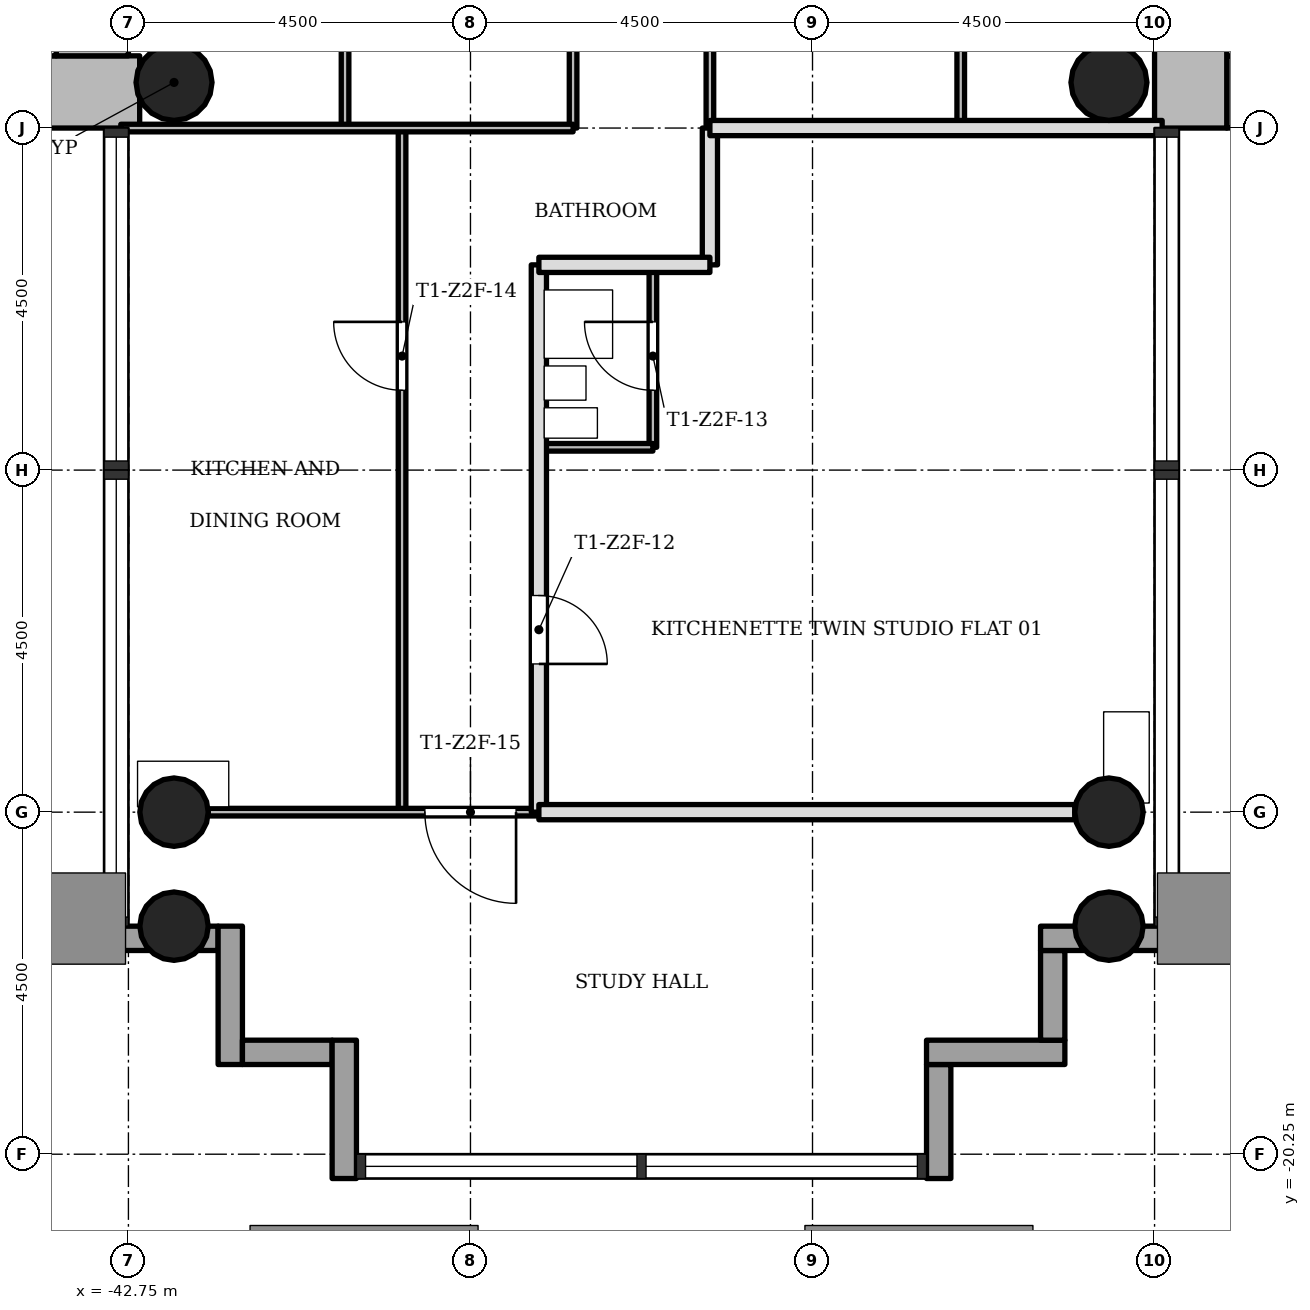
"""IFC4 building model, lengths in metres.
Left out: names, types, materials, properties, quantities, classifications, styles, units other than length and angle.
Written with IfcOpenShell. Run it as: python <this file> out.ifc"""

import sys

from ifc_helpers import new_model, si_unit, direction, frame, frame_2d, origin, origin_2d, place, context, subcontext, project, spatial, rectangle, hollow_circle, extrude, element, fill, save


model = new_model("IFC4")
c1 = context("Model", 3, precision=1e-05, world=origin(), true_north=direction((0.0, 1.0)))
c2 = subcontext(c1, "Body", "Model", "MODEL_VIEW")
j1 = project(units=[si_unit("LENGTHUNIT", "METRE"), si_unit("PLANEANGLEUNIT", "RADIAN")], contexts=[c1])
p1 = place(None, origin())
s1 = spatial("IfcSite", under=j1, at=p1, CompositionType="ELEMENT")
p2 = place(p1, origin())
s2 = spatial("IfcBuilding", under=s1, at=p2, CompositionType="ELEMENT")
p3 = place(p2, frame((0.0, 0.0, 114.0)))
s3 = spatial("IfcBuildingStorey", under=s2, at=p3, CompositionType="ELEMENT", Elevation=114.0)
p4 = place(p3, frame((-28.3, -6.275, 0.0), z_axis=(0.0, 0.0, 1.0), x_axis=(1.0, 0.0, 0.0)))
e1 = element("IfcWall", 1, at=p4, inside=s3, PredefinedType="SHEAR", context=c2, shape_type="SweptSolid", body=[
    extrude(rectangle(XDim=8.05, YDim=0.95, at=frame_2d((4.025, 0.0))), origin(), (0.0, 0.0, 1.0), 3.4),
])
p5 = place(p3, frame((-28.775, 5.8, 0.0), z_axis=(0.0, 0.0, 1.0), x_axis=(0.0, -1.0, 0.0)))
e2 = element("IfcWall", 2, at=p5, inside=s3, PredefinedType="SHEAR", context=c2, shape_type="SweptSolid", body=[
    extrude(rectangle(XDim=12.55, YDim=0.95, at=frame_2d((6.275, 0.0))), origin(), (0.0, 0.0, 1.0), 3.4),
])
p6 = place(p5, frame((4.9, 0.0, 0.0)))
e3 = element("IfcOpeningElement", 3, at=p6, cuts=e2, PredefinedType="OPENING", context=c2, shape_type="SweptSolid", body=[
    extrude(rectangle(XDim=1.8, YDim=2.1, at=frame_2d((0.9, 1.05))), frame((0.0, 0.485, 0.0), z_axis=(0.0, -1.0, 0.0), x_axis=(1.0, 0.0, 0.0)), (0.0, 0.0, 1.0), 0.97),
])
p7 = place(p3, frame((-51.298, -6.275, 0.0), z_axis=(0.0, 0.0, 1.0), x_axis=(1.0, 0.0, 0.0)))
e4 = element("IfcWall", 4, at=p7, inside=s3, PredefinedType="SHEAR", context=c2, shape_type="SweptSolid", body=[
    extrude(rectangle(XDim=8.696, YDim=0.95, at=frame_2d((4.348, 0.0))), origin(), (0.0, 0.0, 1.0), 3.4),
])
p8 = place(p3, frame((-43.225, -5.8, 0.0), z_axis=(0.0, 0.0, 1.0), x_axis=(0.0, 1.0, 0.0)))
e5 = element("IfcWall", 5, at=p8, inside=s3, PredefinedType="SHEAR", context=c2, shape_type="SweptSolid", body=[
    extrude(rectangle(XDim=12.55, YDim=0.95, at=frame_2d((6.275, 0.0))), origin(), (0.0, 0.0, 1.0), 3.4),
])
p9 = place(p8, frame((4.9, 0.0, 0.0)))
e6 = element("IfcOpeningElement", 6, at=p9, cuts=e5, PredefinedType="OPENING", context=c2, shape_type="SweptSolid", body=[
    extrude(rectangle(XDim=1.8, YDim=2.1, at=frame_2d((0.9, 1.05))), frame((0.0, 0.485, 0.0), z_axis=(0.0, -1.0, 0.0), x_axis=(1.0, 0.0, 0.0)), (0.0, 0.0, 1.0), 0.97),
])
for number, where, z_axis, x_axis in (
    (7, (-42.15, -15.75, 0.0), (0.0, 0.0, 1.0), (1.0, 0.0, 0.0)),
    (8, (-29.85, -15.75, 0.0), (0.0, 0.0, 1.0), (1.0, 0.0, 0.0)),
    (9, (-42.15, -17.25, 0.0), (0.0, 0.0, 1.0), (1.0, 0.0, 0.0)),
    (10, (-29.85, -17.25, 0.0), (0.0, 0.0, 1.0), (1.0, 0.0, 0.0)),
):
    element("IfcColumn", number, at=place(p3, frame(where, z_axis=z_axis, x_axis=x_axis)), inside=s3, PredefinedType="COLUMN", context=c2, shape_type="SweptSolid", body=[
        extrude(hollow_circle(Radius=0.45, WallThickness=0.032, at=origin_2d()), origin(), (0.0, 0.0, 1.0), 3.4),
    ])
for number, where, z_axis, x_axis in (
    (11, (-42.15, -6.15, 0.0), (0.0, 0.0, 1.0), (1.0, 0.0, 0.0)),
    (12, (-29.85, -6.15, 0.0), (0.0, 0.0, 1.0), (1.0, 0.0, 0.0)),
):
    element("IfcColumn", number, at=place(p3, frame(where, z_axis=z_axis, x_axis=x_axis)), inside=s3, PredefinedType="COLUMN", context=c2, shape_type="SweptSolid", body=[
        extrude(hollow_circle(Radius=0.5, WallThickness=0.036, at=origin_2d()), origin(), (0.0, 0.0, 1.0), 3.4),
    ])
p10 = place(p3, frame((-43.07, -17.41, -0.3), z_axis=(0.0, 0.0, 1.0), x_axis=(1.0, 0.0, 0.0)))
e13 = element("IfcWall", 13, at=p10, inside=s3, PredefinedType="STANDARD", context=c2, shape_type="SweptSolid", body=[
    extrude(rectangle(XDim=1.5, YDim=0.32, at=frame_2d((0.75, 0.0))), origin(), (0.0, 0.0, 1.0), 3.4),
])
p11 = place(p3, frame((-41.41, -17.25, -0.3), z_axis=(0.0, 0.0, 1.0), x_axis=(0.0, -1.0, 0.0)))
e14 = element("IfcWall", 14, at=p11, inside=s3, PredefinedType="STANDARD", context=c2, shape_type="SweptSolid", body=[
    extrude(rectangle(XDim=1.82, YDim=0.32, at=frame_2d((0.91, 0.0))), origin(), (0.0, 0.0, 1.0), 3.4),
])
p12 = place(p3, frame((-41.25, -18.91, -0.3), z_axis=(0.0, 0.0, 1.0), x_axis=(1.0, 0.0, 0.0)))
e15 = element("IfcWall", 15, at=p12, inside=s3, PredefinedType="STANDARD", context=c2, shape_type="SweptSolid", body=[
    extrude(rectangle(XDim=1.18, YDim=0.32, at=frame_2d((0.59, 0.0))), origin(), (0.0, 0.0, 1.0), 3.4),
])
p13 = place(p3, frame((-39.91, -18.75, -0.3), z_axis=(0.0, 0.0, 1.0), x_axis=(0.0, -1.0, 0.0)))
e16 = element("IfcWall", 16, at=p13, inside=s3, PredefinedType="STANDARD", context=c2, shape_type="SweptSolid", body=[
    extrude(rectangle(XDim=1.82, YDim=0.32, at=frame_2d((0.91, 0.0))), origin(), (0.0, 0.0, 1.0), 3.4),
])
p14 = place(p3, frame((-32.09, -20.57, -0.3), z_axis=(0.0, 0.0, 1.0), x_axis=(0.0, 1.0, 0.0)))
e17 = element("IfcWall", 17, at=p14, inside=s3, PredefinedType="STANDARD", context=c2, shape_type="SweptSolid", body=[
    extrude(rectangle(XDim=1.5, YDim=0.32, at=frame_2d((0.75, 0.0))), origin(), (0.0, 0.0, 1.0), 3.4),
])
p15 = place(p3, frame((-32.25, -18.91, -0.3), z_axis=(0.0, 0.0, 1.0), x_axis=(1.0, 0.0, 0.0)))
e18 = element("IfcWall", 18, at=p15, inside=s3, PredefinedType="STANDARD", context=c2, shape_type="SweptSolid", body=[
    extrude(rectangle(XDim=1.82, YDim=0.32, at=frame_2d((0.91, 0.0))), origin(), (0.0, 0.0, 1.0), 3.4),
])
p16 = place(p3, frame((-30.59, -18.75, -0.3), z_axis=(0.0, 0.0, 1.0), x_axis=(0.0, 1.0, 0.0)))
e19 = element("IfcWall", 19, at=p16, inside=s3, PredefinedType="STANDARD", context=c2, shape_type="SweptSolid", body=[
    extrude(rectangle(XDim=1.18, YDim=0.32, at=frame_2d((0.59, 0.0))), origin(), (0.0, 0.0, 1.0), 3.4),
])
p17 = place(p3, frame((-30.75, -17.41, -0.3), z_axis=(0.0, 0.0, 1.0), x_axis=(1.0, 0.0, 0.0)))
e20 = element("IfcWall", 20, at=p17, inside=s3, PredefinedType="STANDARD", context=c2, shape_type="SweptSolid", body=[
    extrude(rectangle(XDim=1.82, YDim=0.32, at=frame_2d((0.91, 0.0))), origin(), (0.0, 0.0, 1.0), 3.4),
])
p18 = place(p3, frame((-39.9, -6.75, 0.0), z_axis=(0.0, 0.0, 1.0), x_axis=(0.0, 1.0, 0.0)))
e21 = element("IfcWall", 21, at=p18, inside=s3, PredefinedType="PARTITIONING", context=c2, shape_type="SweptSolid", body=[
    extrude(rectangle(XDim=5.25, YDim=0.1, at=frame_2d((2.625, 0.0))), origin(), (0.0, 0.0, 1.0), 3.0),
])
p19 = place(p3, frame((-39.15, -15.75, 0.0), z_axis=(0.0, 0.0, 1.0), x_axis=(0.0, 1.0, 0.0)))
e22 = element("IfcWall", 22, at=p19, inside=s3, PredefinedType="PARTITIONING", context=c2, shape_type="SweptSolid", body=[
    extrude(rectangle(XDim=9.0, YDim=0.1, at=frame_2d((4.5, 0.0))), origin(), (0.0, 0.0, 1.0), 3.0),
])
p20 = place(p19, frame((5.55, 0.0, 0.0)))
e23 = element("IfcOpeningElement", 23, at=p20, cuts=e22, PredefinedType="OPENING", context=c2, shape_type="SweptSolid", body=[
    extrude(rectangle(XDim=0.9, YDim=2.1, at=frame_2d((0.45, 1.05))), frame((0.0, 0.06, 0.0), z_axis=(0.0, -1.0, 0.0), x_axis=(1.0, 0.0, 0.0)), (0.0, 0.0, 1.0), 0.12),
])
p21 = place(p3, frame((-37.35, -15.75, 0.0), z_axis=(0.0, 0.0, 1.0), x_axis=(0.0, 1.0, 0.0)))
e24 = element("IfcWall", 24, at=p21, inside=s3, PredefinedType="SOLIDWALL", context=c2, shape_type="SweptSolid", body=[
    extrude(rectangle(XDim=7.2, YDim=0.2, at=frame_2d((3.6, 0.0))), origin(), (0.0, 0.0, 1.0), 3.0),
])
p22 = place(p21, frame((1.95, 0.0, 0.0)))
e25 = element("IfcOpeningElement", 25, at=p22, cuts=e24, PredefinedType="OPENING", context=c2, shape_type="SweptSolid", body=[
    extrude(rectangle(XDim=0.9, YDim=2.1, at=frame_2d((0.45, 1.05))), frame((0.0, 0.11, 0.0), z_axis=(0.0, -1.0, 0.0), x_axis=(1.0, 0.0, 0.0)), (0.0, 0.0, 1.0), 0.22),
])
p23 = place(p3, frame((-36.9, -6.75, 0.0), z_axis=(0.0, 0.0, 1.0), x_axis=(0.0, 1.0, 0.0)))
e26 = element("IfcWall", 26, at=p23, inside=s3, PredefinedType="PARTITIONING", context=c2, shape_type="SweptSolid", body=[
    extrude(rectangle(XDim=5.25, YDim=0.1, at=frame_2d((2.625, 0.0))), origin(), (0.0, 0.0, 1.0), 3.0),
])
p24 = place(p23, frame((2.175, 0.0, 0.0)))
e27 = element("IfcOpeningElement", 27, at=p24, cuts=e26, PredefinedType="OPENING", context=c2, shape_type="SweptSolid", body=[
    extrude(rectangle(XDim=0.9, YDim=2.1, at=frame_2d((0.45, 1.05))), frame((0.0, 0.06, 0.0), z_axis=(0.0, -1.0, 0.0), x_axis=(1.0, 0.0, 0.0)), (0.0, 0.0, 1.0), 0.12),
])
p25 = place(p3, frame((-35.85, -10.95, 0.0), z_axis=(0.0, 0.0, 1.0), x_axis=(0.0, 1.0, 0.0)))
e28 = element("IfcWall", 28, at=p25, inside=s3, PredefinedType="PARTITIONING", context=c2, shape_type="SweptSolid", body=[
    extrude(rectangle(XDim=2.4, YDim=0.1, at=frame_2d((1.2, 0.0))), origin(), (0.0, 0.0, 1.0), 3.0),
])
p26 = place(p25, frame((0.75, 0.0, 0.0)))
e29 = element("IfcOpeningElement", 29, at=p26, cuts=e28, PredefinedType="OPENING", context=c2, shape_type="SweptSolid", body=[
    extrude(rectangle(XDim=0.9, YDim=2.1, at=frame_2d((0.45, 1.05))), frame((0.0, 0.06, 0.0), z_axis=(0.0, -1.0, 0.0), x_axis=(1.0, 0.0, 0.0)), (0.0, 0.0, 1.0), 0.12),
])
p27 = place(p3, frame((-35.1, -6.75, 0.0), z_axis=(0.0, 0.0, 1.0), x_axis=(0.0, 1.0, 0.0)))
e30 = element("IfcWall", 30, at=p27, inside=s3, PredefinedType="PARTITIONING", context=c2, shape_type="SweptSolid", body=[
    extrude(rectangle(XDim=5.25, YDim=0.1, at=frame_2d((2.625, 0.0))), origin(), (0.0, 0.0, 1.0), 3.0),
])
p28 = place(p27, frame((2.175, 0.0, 0.0)))
e31 = element("IfcOpeningElement", 31, at=p28, cuts=e30, PredefinedType="OPENING", context=c2, shape_type="SweptSolid", body=[
    extrude(rectangle(XDim=0.9, YDim=2.1, at=frame_2d((0.45, 1.05))), frame((0.0, 0.06, 0.0), z_axis=(0.0, -1.0, 0.0), x_axis=(1.0, 0.0, 0.0)), (0.0, 0.0, 1.0), 0.12),
])
p29 = place(p3, frame((-35.1, -8.55, 0.0), z_axis=(0.0, 0.0, 1.0), x_axis=(0.0, 1.0, 0.0)))
e32 = element("IfcWall", 32, at=p29, inside=s3, PredefinedType="SOLIDWALL", context=c2, shape_type="SweptSolid", body=[
    extrude(rectangle(XDim=1.8, YDim=0.2, at=frame_2d((0.9, 0.0))), origin(), (0.0, 0.0, 1.0), 3.0),
])
p30 = place(p3, frame((-31.8, -6.75, 0.0), z_axis=(0.0, 0.0, 1.0), x_axis=(0.0, 1.0, 0.0)))
e33 = element("IfcWall", 33, at=p30, inside=s3, PredefinedType="PARTITIONING", context=c2, shape_type="SweptSolid", body=[
    extrude(rectangle(XDim=5.25, YDim=0.1, at=frame_2d((2.625, 0.0))), origin(), (0.0, 0.0, 1.0), 3.0),
])
p31 = place(p3, frame((-41.7, -15.75, 0.0), z_axis=(0.0, 0.0, 1.0), x_axis=(1.0, 0.0, 0.0)))
e34 = element("IfcWall", 34, at=p31, inside=s3, PredefinedType="PARTITIONING", context=c2, shape_type="SweptSolid", body=[
    extrude(rectangle(XDim=4.35, YDim=0.1, at=frame_2d((2.175, 0.0))), origin(), (0.0, 0.0, 1.0), 3.0),
])
p32 = place(p31, frame((2.85, 0.0, 0.0)))
e35 = element("IfcOpeningElement", 35, at=p32, cuts=e34, PredefinedType="OPENING", context=c2, shape_type="SweptSolid", body=[
    extrude(rectangle(XDim=1.2, YDim=2.1, at=frame_2d((0.6, 1.05))), frame((0.0, 0.06, 0.0), z_axis=(0.0, -1.0, 0.0), x_axis=(1.0, 0.0, 0.0)), (0.0, 0.0, 1.0), 0.12),
])
p33 = place(p3, frame((-37.35, -15.75, 0.0), z_axis=(0.0, 0.0, 1.0), x_axis=(1.0, 0.0, 0.0)))
e36 = element("IfcWall", 36, at=p33, inside=s3, PredefinedType="SOLIDWALL", context=c2, shape_type="SweptSolid", body=[
    extrude(rectangle(XDim=7.05, YDim=0.2, at=frame_2d((3.525, 0.0))), origin(), (0.0, 0.0, 1.0), 3.0),
])
p34 = place(p3, frame((-37.35, -10.95, 0.0), z_axis=(0.0, 0.0, 1.0), x_axis=(1.0, 0.0, 0.0)))
e37 = element("IfcWall", 37, at=p34, inside=s3, PredefinedType="PARTITIONING", context=c2, shape_type="SweptSolid", body=[
    extrude(rectangle(XDim=1.5, YDim=0.1, at=frame_2d((0.75, 0.0))), origin(), (0.0, 0.0, 1.0), 3.0),
])
p35 = place(p3, frame((-37.35, -8.55, 0.0), z_axis=(0.0, 0.0, 1.0), x_axis=(1.0, 0.0, 0.0)))
e38 = element("IfcWall", 38, at=p35, inside=s3, PredefinedType="SOLIDWALL", context=c2, shape_type="SweptSolid", body=[
    extrude(rectangle(XDim=2.25, YDim=0.2, at=frame_2d((1.125, 0.0))), origin(), (0.0, 0.0, 1.0), 3.0),
])
p36 = place(p3, frame((-42.85, -6.75, 0.0), z_axis=(0.0, 0.0, 1.0), x_axis=(1.0, 0.0, 0.0)))
e39 = element("IfcWall", 39, at=p36, inside=s3, PredefinedType="PARTITIONING", context=c2, shape_type="SweptSolid", body=[
    extrude(rectangle(XDim=5.95, YDim=0.1, at=frame_2d((2.975, 0.0))), origin(), (0.0, 0.0, 1.0), 3.0),
])
p37 = place(p3, frame((-35.1, -6.75, 0.0), z_axis=(0.0, 0.0, 1.0), x_axis=(1.0, 0.0, 0.0)))
e40 = element("IfcWall", 40, at=p37, inside=s3, PredefinedType="SOLIDWALL", context=c2, shape_type="SweptSolid", body=[
    extrude(rectangle(XDim=5.95, YDim=0.2, at=frame_2d((2.975, 0.0))), origin(), (0.0, 0.0, 1.0), 3.0),
])
p38 = place(p3, frame((-43.825, -1.9, 0.0), z_axis=(0.0, 0.0, 1.0), x_axis=(0.0, -1.0, 0.0)))
e41 = element("IfcWall", 41, at=p38, inside=s3, PredefinedType="SHEAR", context=c2, shape_type="SweptSolid", body=[
    extrude(rectangle(XDim=3.9, YDim=0.25, at=frame_2d((1.95, 0.0))), origin(), (0.0, 0.0, 1.0), 3.4),
])
p39 = place(p22, origin())
e42 = element("IfcDoor", 42, at=p39, inside=s3, OperationType="SINGLE_SWING_LEFT", PredefinedType="DOOR", context=c2, shape_type="SweptSolid", body=[
    extrude(rectangle(XDim=0.9, YDim=2.1, at=frame_2d((0.45, 1.05))), frame((0.0, 0.025, 0.0), z_axis=(0.0, -1.0, 0.0), x_axis=(1.0, 0.0, 0.0)), (0.0, 0.0, 1.0), 0.05),
])
fill(e25, e42)
p40 = place(p26, origin())
e43 = element("IfcDoor", 43, at=p40, inside=s3, OperationType="SINGLE_SWING_LEFT", PredefinedType="DOOR", context=c2, shape_type="SweptSolid", body=[
    extrude(rectangle(XDim=0.9, YDim=2.1, at=frame_2d((0.45, 1.05))), frame((0.0, 0.025, 0.0), z_axis=(0.0, -1.0, 0.0), x_axis=(1.0, 0.0, 0.0)), (0.0, 0.0, 1.0), 0.05),
])
fill(e29, e43)
p41 = place(p20, origin())
e44 = element("IfcDoor", 44, at=p41, inside=s3, OperationType="SINGLE_SWING_LEFT", PredefinedType="DOOR", context=c2, shape_type="SweptSolid", body=[
    extrude(rectangle(XDim=0.9, YDim=2.1, at=frame_2d((0.45, 1.05))), frame((0.0, 0.025, 0.0), z_axis=(0.0, -1.0, 0.0), x_axis=(1.0, 0.0, 0.0)), (0.0, 0.0, 1.0), 0.05),
])
fill(e23, e44)
p42 = place(p32, origin())
e45 = element("IfcDoor", 45, at=p42, inside=s3, OperationType="SINGLE_SWING_RIGHT", PredefinedType="DOOR", context=c2, shape_type="SweptSolid", body=[
    extrude(rectangle(XDim=1.2, YDim=2.1, at=frame_2d((0.6, 1.05))), frame((0.0, 0.025, 0.0), z_axis=(0.0, -1.0, 0.0), x_axis=(1.0, 0.0, 0.0)), (0.0, 0.0, 1.0), 0.05),
])
fill(e35, e45)
save(model, sys.argv[1])
